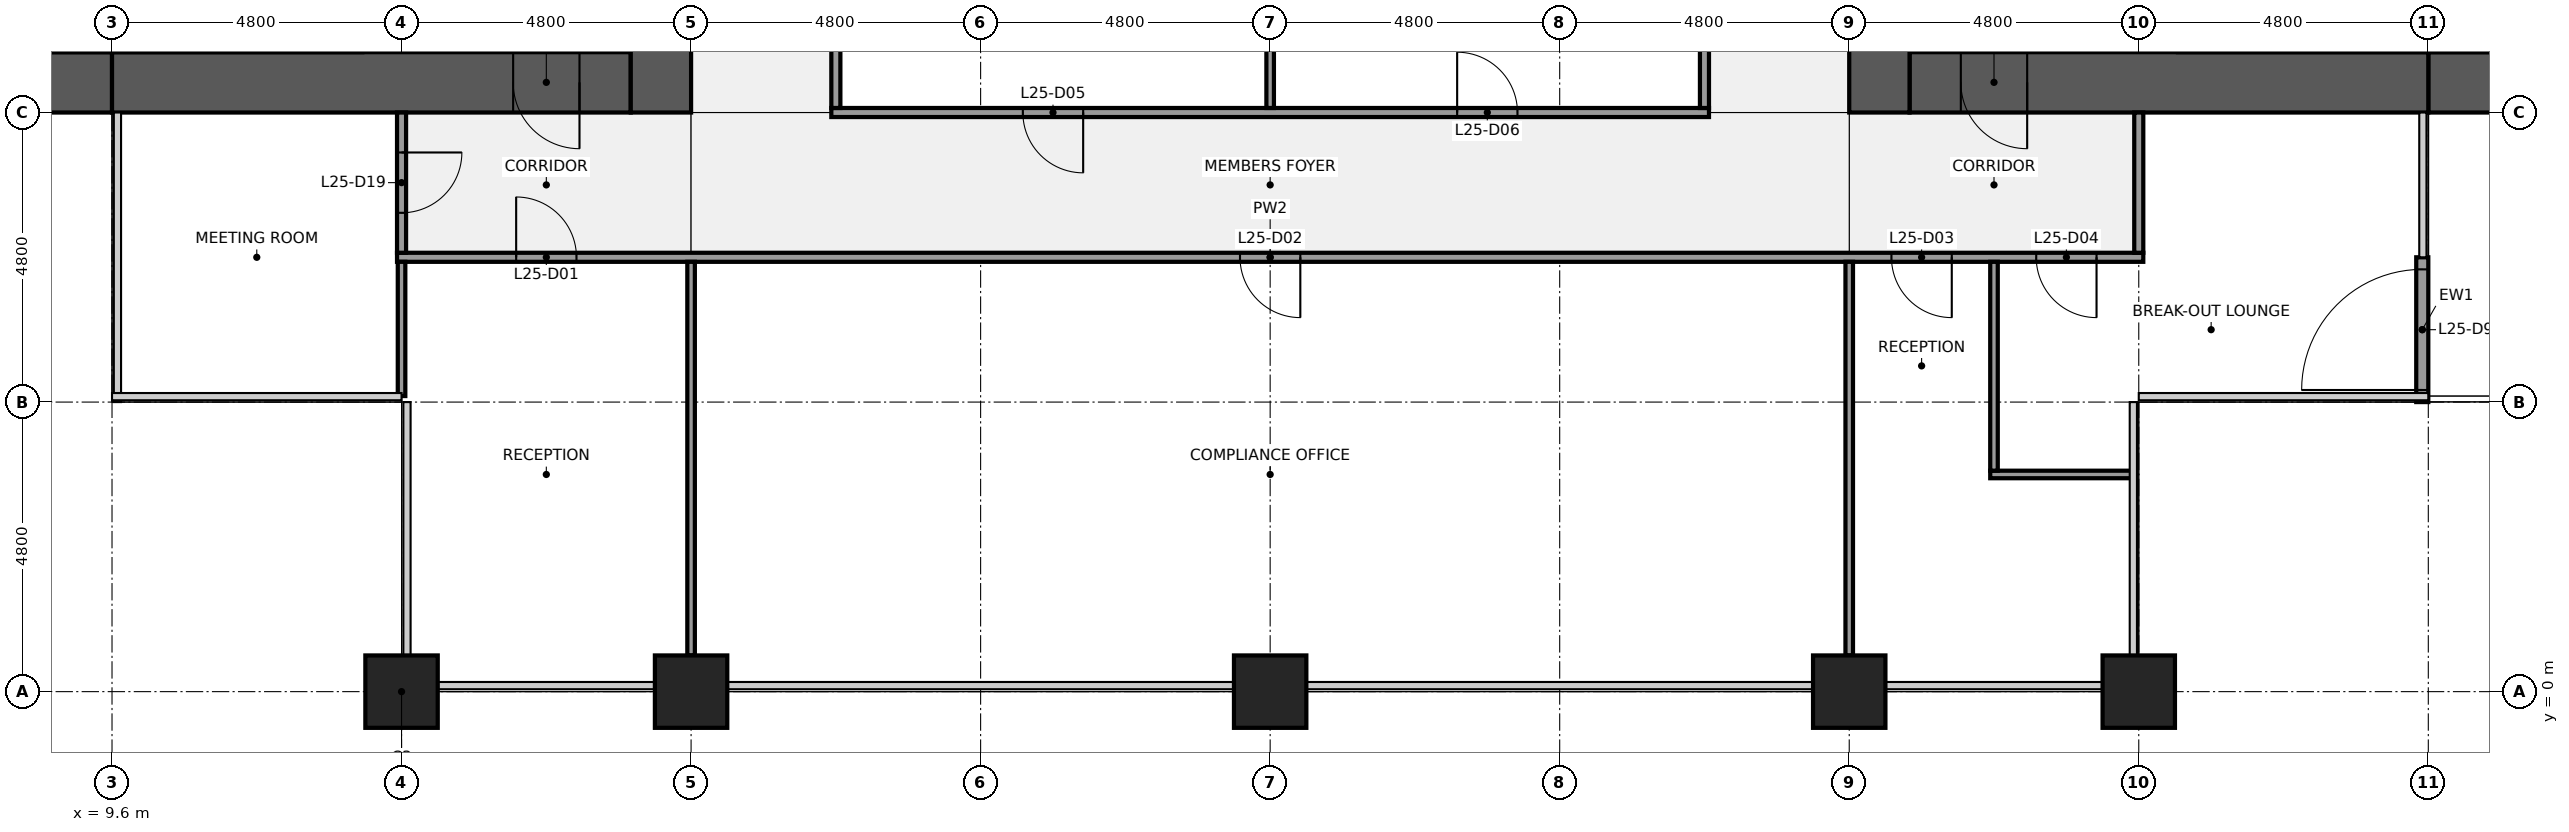
"""IFC4 building model, lengths in metres.
Left out: names, types, materials, properties, quantities, classifications, styles, units other than length and angle.
Written with IfcOpenShell. Run it as: python <this file> out.ifc"""

import sys

from ifc_helpers import new_model, si_unit, direction, frame, frame_2d, origin, origin_2d, place, context, subcontext, project, spatial, rectangle, extrude, element, fill, save


model = new_model("IFC4")
c1 = context("Model", 3, precision=1e-05, world=origin(), true_north=direction((0.0, 1.0)))
c2 = subcontext(c1, "Body", "Model", "MODEL_VIEW")
j1 = project(units=[si_unit("LENGTHUNIT", "METRE"), si_unit("PLANEANGLEUNIT", "RADIAN")], contexts=[c1])
p1 = place(None, origin())
s1 = spatial("IfcSite", under=j1, at=p1, CompositionType="ELEMENT")
p2 = place(p1, origin())
s2 = spatial("IfcBuilding", under=s1, at=p2, CompositionType="ELEMENT")
p3 = place(p2, frame((0.0, 0.0, 120.1)))
s3 = spatial("IfcBuildingStorey", under=s2, at=p3, CompositionType="ELEMENT", Elevation=120.1)
for number, where, z_axis, x_axis in (
    (1, (14.4, 0.0, 0.0), (0.0, 0.0, 1.0), (1.0, 0.0, 0.0)),
    (2, (19.2, 0.0, 0.0), (0.0, 0.0, 1.0), (1.0, 0.0, 0.0)),
    (3, (28.8, 0.0, 0.0), (0.0, 0.0, 1.0), (1.0, 0.0, 0.0)),
    (4, (38.4, 0.0, 0.0), (0.0, 0.0, 1.0), (1.0, 0.0, 0.0)),
    (5, (43.2, 0.0, 0.0), (0.0, 0.0, 1.0), (1.0, 0.0, 0.0)),
):
    element("IfcColumn", number, at=place(p3, frame(where, z_axis=z_axis, x_axis=x_axis)), inside=s3, PredefinedType="COLUMN", context=c2, shape_type="SweptSolid", body=[
        extrude(rectangle(XDim=1.2, YDim=1.2, at=origin_2d()), origin(), (0.0, 0.0, 1.0), 4.0),
    ])
p4 = place(p3, frame((9.6, 10.1, 0.0), z_axis=(0.0, 0.0, 1.0), x_axis=(-1.0, 0.0, 0.0)))
e6 = element("IfcWall", 6, at=p4, inside=s3, PredefinedType="SHEAR", context=c2, shape_type="SweptSolid", body=[
    extrude(rectangle(XDim=8.6, YDim=1.0, at=frame_2d((4.3, 0.0))), origin(), (0.0, 0.0, 1.0), 3.84),
])
p5 = place(p4, frame((1.5, 0.0, 0.9)))
e7 = element("IfcOpeningElement", 7, at=p5, cuts=e6, PredefinedType="OPENING", context=c2, shape_type="SweptSolid", body=[
    extrude(rectangle(XDim=1.8, YDim=1.5, at=frame_2d((0.9, 0.75))), frame((0.0, 0.51, 0.0), z_axis=(0.0, -1.0, 0.0), x_axis=(1.0, 0.0, 0.0)), (0.0, 0.0, 1.0), 1.02),
])
p6 = place(p3, frame((18.2, 10.1, 0.0), z_axis=(0.0, 0.0, 1.0), x_axis=(-1.0, 0.0, 0.0)))
e8 = element("IfcWall", 8, at=p6, inside=s3, PredefinedType="SHEAR", context=c2, shape_type="SweptSolid", body=[
    extrude(rectangle(XDim=8.6, YDim=1.0, at=frame_2d((4.3, 0.0))), origin(), (0.0, 0.0, 1.0), 3.84),
])
p7 = place(p6, frame((0.85, 0.0, 0.0)))
e9 = element("IfcOpeningElement", 9, at=p7, cuts=e8, PredefinedType="OPENING", context=c2, shape_type="SweptSolid", body=[
    extrude(rectangle(XDim=1.1, YDim=2.1, at=frame_2d((0.55, 1.05))), frame((0.0, 0.51, 0.0), z_axis=(0.0, -1.0, 0.0), x_axis=(1.0, 0.0, 0.0)), (0.0, 0.0, 1.0), 1.02),
])
p8 = place(p3, frame((18.7, 38.4, 0.0), z_axis=(0.0, 0.0, 1.0), x_axis=(0.0, -1.0, 0.0)))
e10 = element("IfcWall", 10, at=p8, inside=s3, PredefinedType="SHEAR", context=c2, shape_type="SweptSolid", body=[
    extrude(rectangle(XDim=28.8, YDim=1.0, at=frame_2d((14.4, 0.0))), origin(), (0.0, 0.0, 1.0), 3.84),
])
p9 = place(p8, frame((18.3, 0.0, 0.0)))
e11 = element("IfcOpeningElement", 11, at=p9, cuts=e10, PredefinedType="OPENING", context=c2, shape_type="SweptSolid", body=[
    extrude(rectangle(XDim=1.8, YDim=2.1, at=frame_2d((0.9, 1.05))), frame((0.0, 0.51, 0.0), z_axis=(0.0, -1.0, 0.0), x_axis=(1.0, 0.0, 0.0)), (0.0, 0.0, 1.0), 1.02),
])
p10 = place(p8, frame((8.7, 0.0, 0.0)))
e12 = element("IfcOpeningElement", 12, at=p10, cuts=e10, PredefinedType="OPENING", context=c2, shape_type="SweptSolid", body=[
    extrude(rectangle(XDim=1.8, YDim=2.1, at=frame_2d((0.9, 1.05))), frame((0.0, 0.51, 0.0), z_axis=(0.0, -1.0, 0.0), x_axis=(1.0, 0.0, 0.0)), (0.0, 0.0, 1.0), 1.02),
])
p11 = place(p3, frame((6.25, 10.7, 0.0), z_axis=(0.0, 0.0, 1.0), x_axis=(1.0, 0.0, 0.0)))
e13 = element("IfcWall", 13, at=p11, inside=s3, PredefinedType="SHEAR", context=c2, shape_type="SweptSolid", body=[
    extrude(rectangle(XDim=3.35, YDim=0.2, at=frame_2d((1.675, 0.0))), origin(), (0.0, 0.0, 1.0), 3.84),
])
p12 = place(p3, frame((9.6, 10.7, 0.0), z_axis=(0.0, 0.0, 1.0), x_axis=(1.0, 0.0, 0.0)))
e14 = element("IfcWall", 14, at=p12, inside=s3, PredefinedType="SHEAR", context=c2, shape_type="SweptSolid", body=[
    extrude(rectangle(XDim=4.15, YDim=0.2, at=frame_2d((2.075, 0.0))), origin(), (0.0, 0.0, 1.0), 3.84),
])
p13 = place(p3, frame((56.6, 10.1, 0.0), z_axis=(0.0, 0.0, 1.0), x_axis=(-1.0, 0.0, 0.0)))
e15 = element("IfcWall", 15, at=p13, inside=s3, PredefinedType="SHEAR", context=c2, shape_type="SweptSolid", body=[
    extrude(rectangle(XDim=8.6, YDim=1.0, at=frame_2d((4.3, 0.0))), origin(), (0.0, 0.0, 1.0), 3.84),
])
p14 = place(p13, frame((5.3, 0.0, 0.9)))
e16 = element("IfcOpeningElement", 16, at=p14, cuts=e15, PredefinedType="OPENING", context=c2, shape_type="SweptSolid", body=[
    extrude(rectangle(XDim=1.8, YDim=1.5, at=frame_2d((0.9, 0.75))), frame((0.0, 0.51, 0.0), z_axis=(0.0, -1.0, 0.0), x_axis=(1.0, 0.0, 0.0)), (0.0, 0.0, 1.0), 1.02),
])
p15 = place(p3, frame((48.0, 10.1, 0.0), z_axis=(0.0, 0.0, 1.0), x_axis=(-1.0, 0.0, 0.0)))
e17 = element("IfcWall", 17, at=p15, inside=s3, PredefinedType="SHEAR", context=c2, shape_type="SweptSolid", body=[
    extrude(rectangle(XDim=8.6, YDim=1.0, at=frame_2d((4.3, 0.0))), origin(), (0.0, 0.0, 1.0), 3.84),
])
p16 = place(p15, frame((6.65, 0.0, 0.0)))
e18 = element("IfcOpeningElement", 18, at=p16, cuts=e17, PredefinedType="OPENING", context=c2, shape_type="SweptSolid", body=[
    extrude(rectangle(XDim=1.1, YDim=2.1, at=frame_2d((0.55, 1.05))), frame((0.0, 0.51, 0.0), z_axis=(0.0, -1.0, 0.0), x_axis=(1.0, 0.0, 0.0)), (0.0, 0.0, 1.0), 1.02),
])
p17 = place(p3, frame((38.9, 9.6, 0.0), z_axis=(0.0, 0.0, 1.0), x_axis=(0.0, 1.0, 0.0)))
e19 = element("IfcWall", 19, at=p17, inside=s3, PredefinedType="SHEAR", context=c2, shape_type="SweptSolid", body=[
    extrude(rectangle(XDim=28.8, YDim=1.0, at=frame_2d((14.4, 0.0))), origin(), (0.0, 0.0, 1.0), 3.84),
])
p18 = place(p17, frame((8.7, 0.0, 0.0)))
e20 = element("IfcOpeningElement", 20, at=p18, cuts=e19, PredefinedType="OPENING", context=c2, shape_type="SweptSolid", body=[
    extrude(rectangle(XDim=1.8, YDim=2.1, at=frame_2d((0.9, 1.05))), frame((0.0, 0.51, 0.0), z_axis=(0.0, -1.0, 0.0), x_axis=(1.0, 0.0, 0.0)), (0.0, 0.0, 1.0), 1.02),
])
p19 = place(p17, frame((18.3, 0.0, 0.0)))
e21 = element("IfcOpeningElement", 21, at=p19, cuts=e19, PredefinedType="OPENING", context=c2, shape_type="SweptSolid", body=[
    extrude(rectangle(XDim=1.8, YDim=2.1, at=frame_2d((0.9, 1.05))), frame((0.0, 0.51, 0.0), z_axis=(0.0, -1.0, 0.0), x_axis=(1.0, 0.0, 0.0)), (0.0, 0.0, 1.0), 1.02),
])
p20 = place(p3, frame((48.0, 10.7, 0.0), z_axis=(0.0, 0.0, 1.0), x_axis=(1.0, 0.0, 0.0)))
e22 = element("IfcWall", 22, at=p20, inside=s3, PredefinedType="SHEAR", context=c2, shape_type="SweptSolid", body=[
    extrude(rectangle(XDim=3.35, YDim=0.2, at=frame_2d((1.675, 0.0))), origin(), (0.0, 0.0, 1.0), 3.84),
])
p21 = place(p3, frame((43.85, 10.7, 0.0), z_axis=(0.0, 0.0, 1.0), x_axis=(1.0, 0.0, 0.0)))
e23 = element("IfcWall", 23, at=p21, inside=s3, PredefinedType="SHEAR", context=c2, shape_type="SweptSolid", body=[
    extrude(rectangle(XDim=4.15, YDim=0.2, at=frame_2d((2.075, 0.0))), origin(), (0.0, 0.0, 1.0), 3.84),
])
p22 = place(p3, frame((40.738, 3.6, 0.0), z_axis=(0.0, 0.0, 1.0), x_axis=(1.0, 0.0, 0.0)))
e24 = element("IfcWall", 24, at=p22, inside=s3, PredefinedType="PARTITIONING", context=c2, shape_type="SweptSolid", body=[
    extrude(rectangle(XDim=2.363, YDim=0.125, at=frame_2d((1.181, 0.0))), origin(), (0.0, 0.0, 1.0), 2.936),
])
p23 = place(p3, frame((14.325, 7.2, 0.0), z_axis=(0.0, 0.0, 1.0), x_axis=(1.0, 0.0, 0.0)))
e25 = element("IfcWall", 25, at=p23, inside=s3, PredefinedType="PARTITIONING", context=c2, shape_type="SweptSolid", body=[
    extrude(rectangle(XDim=28.95, YDim=0.15, at=frame_2d((14.475, 0.0))), origin(), (0.0, 0.0, 1.0), 2.936),
])
p24 = place(p23, frame((1.975, 0.0, 0.0)))
e26 = element("IfcOpeningElement", 26, at=p24, cuts=e25, PredefinedType="OPENING", context=c2, shape_type="SweptSolid", body=[
    extrude(rectangle(XDim=1.0, YDim=2.1, at=frame_2d((0.5, 1.05))), frame((0.0, 0.085, 0.0), z_axis=(0.0, -1.0, 0.0), x_axis=(1.0, 0.0, 0.0)), (0.0, 0.0, 1.0), 0.17),
])
p25 = place(p23, frame((13.975, 0.0, 0.0)))
e27 = element("IfcOpeningElement", 27, at=p25, cuts=e25, PredefinedType="OPENING", context=c2, shape_type="SweptSolid", body=[
    extrude(rectangle(XDim=1.0, YDim=2.1, at=frame_2d((0.5, 1.05))), frame((0.0, 0.085, 0.0), z_axis=(0.0, -1.0, 0.0), x_axis=(1.0, 0.0, 0.0)), (0.0, 0.0, 1.0), 0.17),
])
p26 = place(p23, frame((24.775, 0.0, 0.0)))
e28 = element("IfcOpeningElement", 28, at=p26, cuts=e25, PredefinedType="OPENING", context=c2, shape_type="SweptSolid", body=[
    extrude(rectangle(XDim=1.0, YDim=2.1, at=frame_2d((0.5, 1.05))), frame((0.0, 0.085, 0.0), z_axis=(0.0, -1.0, 0.0), x_axis=(1.0, 0.0, 0.0)), (0.0, 0.0, 1.0), 0.17),
])
p27 = place(p23, frame((27.175, 0.0, 0.0)))
e29 = element("IfcOpeningElement", 29, at=p27, cuts=e25, PredefinedType="OPENING", context=c2, shape_type="SweptSolid", body=[
    extrude(rectangle(XDim=1.0, YDim=2.1, at=frame_2d((0.5, 1.05))), frame((0.0, 0.085, 0.0), z_axis=(0.0, -1.0, 0.0), x_axis=(1.0, 0.0, 0.0)), (0.0, 0.0, 1.0), 0.17),
])
p28 = place(p3, frame((21.525, 9.6, 0.0), z_axis=(0.0, 0.0, 1.0), x_axis=(1.0, 0.0, 0.0)))
e30 = element("IfcWall", 30, at=p28, inside=s3, PredefinedType="PARTITIONING", context=c2, shape_type="SweptSolid", body=[
    extrude(rectangle(XDim=14.55, YDim=0.15, at=frame_2d((7.275, 0.0))), origin(), (0.0, 0.0, 1.0), 2.936),
])
p29 = place(p28, frame((3.175, 0.0, 0.0)))
e31 = element("IfcOpeningElement", 31, at=p29, cuts=e30, PredefinedType="OPENING", context=c2, shape_type="SweptSolid", body=[
    extrude(rectangle(XDim=1.0, YDim=2.1, at=frame_2d((0.5, 1.05))), frame((0.0, 0.085, 0.0), z_axis=(0.0, -1.0, 0.0), x_axis=(1.0, 0.0, 0.0)), (0.0, 0.0, 1.0), 0.17),
])
p30 = place(p28, frame((10.375, 0.0, 0.0)))
e32 = element("IfcOpeningElement", 32, at=p30, cuts=e30, PredefinedType="OPENING", context=c2, shape_type="SweptSolid", body=[
    extrude(rectangle(XDim=1.0, YDim=2.1, at=frame_2d((0.5, 1.05))), frame((0.0, 0.085, 0.0), z_axis=(0.0, -1.0, 0.0), x_axis=(1.0, 0.0, 0.0)), (0.0, 0.0, 1.0), 0.17),
])
p31 = place(p3, frame((14.4, 4.9, 0.0), z_axis=(0.0, 0.0, 1.0), x_axis=(0.0, 1.0, 0.0)))
e33 = element("IfcWall", 33, at=p31, inside=s3, PredefinedType="PARTITIONING", context=c2, shape_type="SweptSolid", body=[
    extrude(rectangle(XDim=2.225, YDim=0.125, at=frame_2d((1.113, 0.0))), origin(), (0.0, 0.0, 1.0), 2.936),
])
p32 = place(p3, frame((14.4, 7.275, 0.0), z_axis=(0.0, 0.0, 1.0), x_axis=(0.0, 1.0, 0.0)))
e34 = element("IfcWall", 34, at=p32, inside=s3, PredefinedType="PARTITIONING", context=c2, shape_type="SweptSolid", body=[
    extrude(rectangle(XDim=2.325, YDim=0.15, at=frame_2d((1.163, 0.0))), origin(), (0.0, 0.0, 1.0), 2.936),
])
p33 = place(p32, frame((0.663, 0.0, 0.0)))
e35 = element("IfcOpeningElement", 35, at=p33, cuts=e34, PredefinedType="OPENING", context=c2, shape_type="SweptSolid", body=[
    extrude(rectangle(XDim=1.0, YDim=2.1, at=frame_2d((0.5, 1.05))), frame((0.0, 0.085, 0.0), z_axis=(0.0, -1.0, 0.0), x_axis=(1.0, 0.0, 0.0)), (0.0, 0.0, 1.0), 0.17),
])
p34 = place(p3, frame((19.2, 0.6, 0.0), z_axis=(0.0, 0.0, 1.0), x_axis=(0.0, 1.0, 0.0)))
e36 = element("IfcWall", 36, at=p34, inside=s3, PredefinedType="PARTITIONING", context=c2, shape_type="SweptSolid", body=[
    extrude(rectangle(XDim=6.525, YDim=0.125, at=frame_2d((3.262, 0.0))), origin(), (0.0, 0.0, 1.0), 2.936),
])
p35 = place(p3, frame((21.6, 9.675, 0.0), z_axis=(0.0, 0.0, 1.0), x_axis=(0.0, 1.0, 0.0)))
e37 = element("IfcWall", 37, at=p35, inside=s3, PredefinedType="PARTITIONING", context=c2, shape_type="SweptSolid", body=[
    extrude(rectangle(XDim=4.65, YDim=0.15, at=frame_2d((2.325, 0.0))), origin(), (0.0, 0.0, 1.0), 2.936),
])
p36 = place(p3, frame((28.8, 9.675, 0.0), z_axis=(0.0, 0.0, 1.0), x_axis=(0.0, 1.0, 0.0)))
e38 = element("IfcWall", 38, at=p36, inside=s3, PredefinedType="PARTITIONING", context=c2, shape_type="SweptSolid", body=[
    extrude(rectangle(XDim=4.662, YDim=0.125, at=frame_2d((2.331, 0.0))), origin(), (0.0, 0.0, 1.0), 2.936),
])
p37 = place(p3, frame((36.0, 9.675, 0.0), z_axis=(0.0, 0.0, 1.0), x_axis=(0.0, 1.0, 0.0)))
e39 = element("IfcWall", 39, at=p37, inside=s3, PredefinedType="PARTITIONING", context=c2, shape_type="SweptSolid", body=[
    extrude(rectangle(XDim=4.65, YDim=0.15, at=frame_2d((2.325, 0.0))), origin(), (0.0, 0.0, 1.0), 2.936),
])
p38 = place(p3, frame((38.4, 0.6, 0.0), z_axis=(0.0, 0.0, 1.0), x_axis=(0.0, 1.0, 0.0)))
e40 = element("IfcWall", 40, at=p38, inside=s3, PredefinedType="PARTITIONING", context=c2, shape_type="SweptSolid", body=[
    extrude(rectangle(XDim=6.525, YDim=0.125, at=frame_2d((3.262, 0.0))), origin(), (0.0, 0.0, 1.0), 2.936),
])
p39 = place(p3, frame((40.8, 3.663, 0.0), z_axis=(0.0, 0.0, 1.0), x_axis=(0.0, 1.0, 0.0)))
e41 = element("IfcWall", 41, at=p39, inside=s3, PredefinedType="PARTITIONING", context=c2, shape_type="SweptSolid", body=[
    extrude(rectangle(XDim=3.462, YDim=0.125, at=frame_2d((1.731, 0.0))), origin(), (0.0, 0.0, 1.0), 2.936),
])
p40 = place(p3, frame((43.2, 7.275, 0.0), z_axis=(0.0, 0.0, 1.0), x_axis=(0.0, 1.0, 0.0)))
e42 = element("IfcWall", 42, at=p40, inside=s3, PredefinedType="PARTITIONING", context=c2, shape_type="SweptSolid", body=[
    extrude(rectangle(XDim=2.325, YDim=0.15, at=frame_2d((1.163, 0.0))), origin(), (0.0, 0.0, 1.0), 2.936),
])
p41 = place(p3, frame((47.9, 4.8, 0.0), z_axis=(0.0, 0.0, 1.0), x_axis=(0.0, 1.0, 0.0)))
e43 = element("IfcWall", 43, at=p41, inside=s3, PredefinedType="SOLIDWALL", context=c2, shape_type="SweptSolid", body=[
    extrude(rectangle(XDim=2.4, YDim=0.2, at=frame_2d((1.2, 0.0))), origin(), (0.0, 0.0, 1.0), 3.238),
])
p42 = place(p41, frame((0.2, 0.0, 0.0)))
e44 = element("IfcOpeningElement", 44, at=p42, cuts=e43, PredefinedType="OPENING", context=c2, shape_type="SweptSolid", body=[
    extrude(rectangle(XDim=2.0, YDim=2.1, at=frame_2d((1.0, 1.05))), frame((0.0, 0.11, 0.0), z_axis=(0.0, -1.0, 0.0), x_axis=(1.0, 0.0, 0.0)), (0.0, 0.0, 1.0), 0.22),
])
for number, where, z_axis, x_axis in (
    (45, (14.4, -1.05, 0.0), (0.0, 0.0, 1.0), (1.0, 0.0, 0.0)),
    (46, (19.2, -1.05, 0.0), (0.0, 0.0, 1.0), (1.0, 0.0, 0.0)),
    (47, (38.4, -1.05, 0.0), (0.0, 0.0, 1.0), (1.0, 0.0, 0.0)),
    (48, (43.2, -1.05, 0.0), (0.0, 0.0, 1.0), (1.0, 0.0, 0.0)),
):
    element("IfcColumn", number, at=place(p3, frame(where, z_axis=z_axis, x_axis=x_axis)), inside=s3, PredefinedType="PILASTER", context=c2, shape_type="SweptSolid", body=[
        extrude(rectangle(XDim=3.6, YDim=0.9, at=origin_2d()), origin(), (0.0, 0.0, 1.0), 4.0),
    ])
p43 = place(p7, origin())
e49 = element("IfcDoor", 49, at=p43, inside=s3, OperationType="SINGLE_SWING_LEFT", PredefinedType="DOOR", context=c2, shape_type="SweptSolid", body=[
    extrude(rectangle(XDim=1.1, YDim=2.1, at=frame_2d((0.55, 1.05))), frame((0.0, 0.025, 0.0), z_axis=(0.0, -1.0, 0.0), x_axis=(1.0, 0.0, 0.0)), (0.0, 0.0, 1.0), 0.05),
])
fill(e9, e49)
p44 = place(p16, origin())
e50 = element("IfcDoor", 50, at=p44, inside=s3, OperationType="SINGLE_SWING_LEFT", PredefinedType="DOOR", context=c2, shape_type="SweptSolid", body=[
    extrude(rectangle(XDim=1.1, YDim=2.1, at=frame_2d((0.55, 1.05))), frame((0.0, 0.025, 0.0), z_axis=(0.0, -1.0, 0.0), x_axis=(1.0, 0.0, 0.0)), (0.0, 0.0, 1.0), 0.05),
])
fill(e18, e50)
p45 = place(p24, origin())
e51 = element("IfcDoor", 51, at=p45, inside=s3, OperationType="SINGLE_SWING_LEFT", PredefinedType="DOOR", context=c2, shape_type="SweptSolid", body=[
    extrude(rectangle(XDim=1.0, YDim=2.1, at=frame_2d((0.5, 1.05))), frame((0.0, 0.025, 0.0), z_axis=(0.0, -1.0, 0.0), x_axis=(1.0, 0.0, 0.0)), (0.0, 0.0, 1.0), 0.05),
])
fill(e26, e51)
p46 = place(p25, origin())
e52 = element("IfcDoor", 52, at=p46, inside=s3, OperationType="SINGLE_SWING_RIGHT", PredefinedType="DOOR", context=c2, shape_type="SweptSolid", body=[
    extrude(rectangle(XDim=1.0, YDim=2.1, at=frame_2d((0.5, 1.05))), frame((0.0, 0.025, 0.0), z_axis=(0.0, -1.0, 0.0), x_axis=(1.0, 0.0, 0.0)), (0.0, 0.0, 1.0), 0.05),
])
fill(e27, e52)
p47 = place(p26, origin())
e53 = element("IfcDoor", 53, at=p47, inside=s3, OperationType="SINGLE_SWING_RIGHT", PredefinedType="DOOR", context=c2, shape_type="SweptSolid", body=[
    extrude(rectangle(XDim=1.0, YDim=2.1, at=frame_2d((0.5, 1.05))), frame((0.0, 0.025, 0.0), z_axis=(0.0, -1.0, 0.0), x_axis=(1.0, 0.0, 0.0)), (0.0, 0.0, 1.0), 0.05),
])
fill(e28, e53)
p48 = place(p27, origin())
e54 = element("IfcDoor", 54, at=p48, inside=s3, OperationType="SINGLE_SWING_RIGHT", PredefinedType="DOOR", context=c2, shape_type="SweptSolid", body=[
    extrude(rectangle(XDim=1.0, YDim=2.1, at=frame_2d((0.5, 1.05))), frame((0.0, 0.025, 0.0), z_axis=(0.0, -1.0, 0.0), x_axis=(1.0, 0.0, 0.0)), (0.0, 0.0, 1.0), 0.05),
])
fill(e29, e54)
p49 = place(p29, origin())
e55 = element("IfcDoor", 55, at=p49, inside=s3, OperationType="SINGLE_SWING_RIGHT", PredefinedType="DOOR", context=c2, shape_type="SweptSolid", body=[
    extrude(rectangle(XDim=1.0, YDim=2.1, at=frame_2d((0.5, 1.05))), frame((0.0, 0.025, 0.0), z_axis=(0.0, -1.0, 0.0), x_axis=(1.0, 0.0, 0.0)), (0.0, 0.0, 1.0), 0.05),
])
fill(e31, e55)
p50 = place(p30, origin())
e56 = element("IfcDoor", 56, at=p50, inside=s3, OperationType="SINGLE_SWING_LEFT", PredefinedType="DOOR", context=c2, shape_type="SweptSolid", body=[
    extrude(rectangle(XDim=1.0, YDim=2.1, at=frame_2d((0.5, 1.05))), frame((0.0, 0.025, 0.0), z_axis=(0.0, -1.0, 0.0), x_axis=(1.0, 0.0, 0.0)), (0.0, 0.0, 1.0), 0.05),
])
fill(e32, e56)
p51 = place(p33, origin())
e57 = element("IfcDoor", 57, at=p51, inside=s3, OperationType="SINGLE_SWING_RIGHT", PredefinedType="DOOR", context=c2, shape_type="SweptSolid", body=[
    extrude(rectangle(XDim=1.0, YDim=2.1, at=frame_2d((0.5, 1.05))), frame((0.0, 0.025, 0.0), z_axis=(0.0, -1.0, 0.0), x_axis=(1.0, 0.0, 0.0)), (0.0, 0.0, 1.0), 0.05),
])
fill(e35, e57)
p52 = place(p42, origin())
e58 = element("IfcDoor", 58, at=p52, inside=s3, OperationType="SINGLE_SWING_LEFT", PredefinedType="DOOR", context=c2, shape_type="SweptSolid", body=[
    extrude(rectangle(XDim=2.0, YDim=2.1, at=frame_2d((1.0, 1.05))), frame((0.0, 0.025, 0.0), z_axis=(0.0, -1.0, 0.0), x_axis=(1.0, 0.0, 0.0)), (0.0, 0.0, 1.0), 0.05),
])
fill(e44, e58)
save(model, sys.argv[1])
